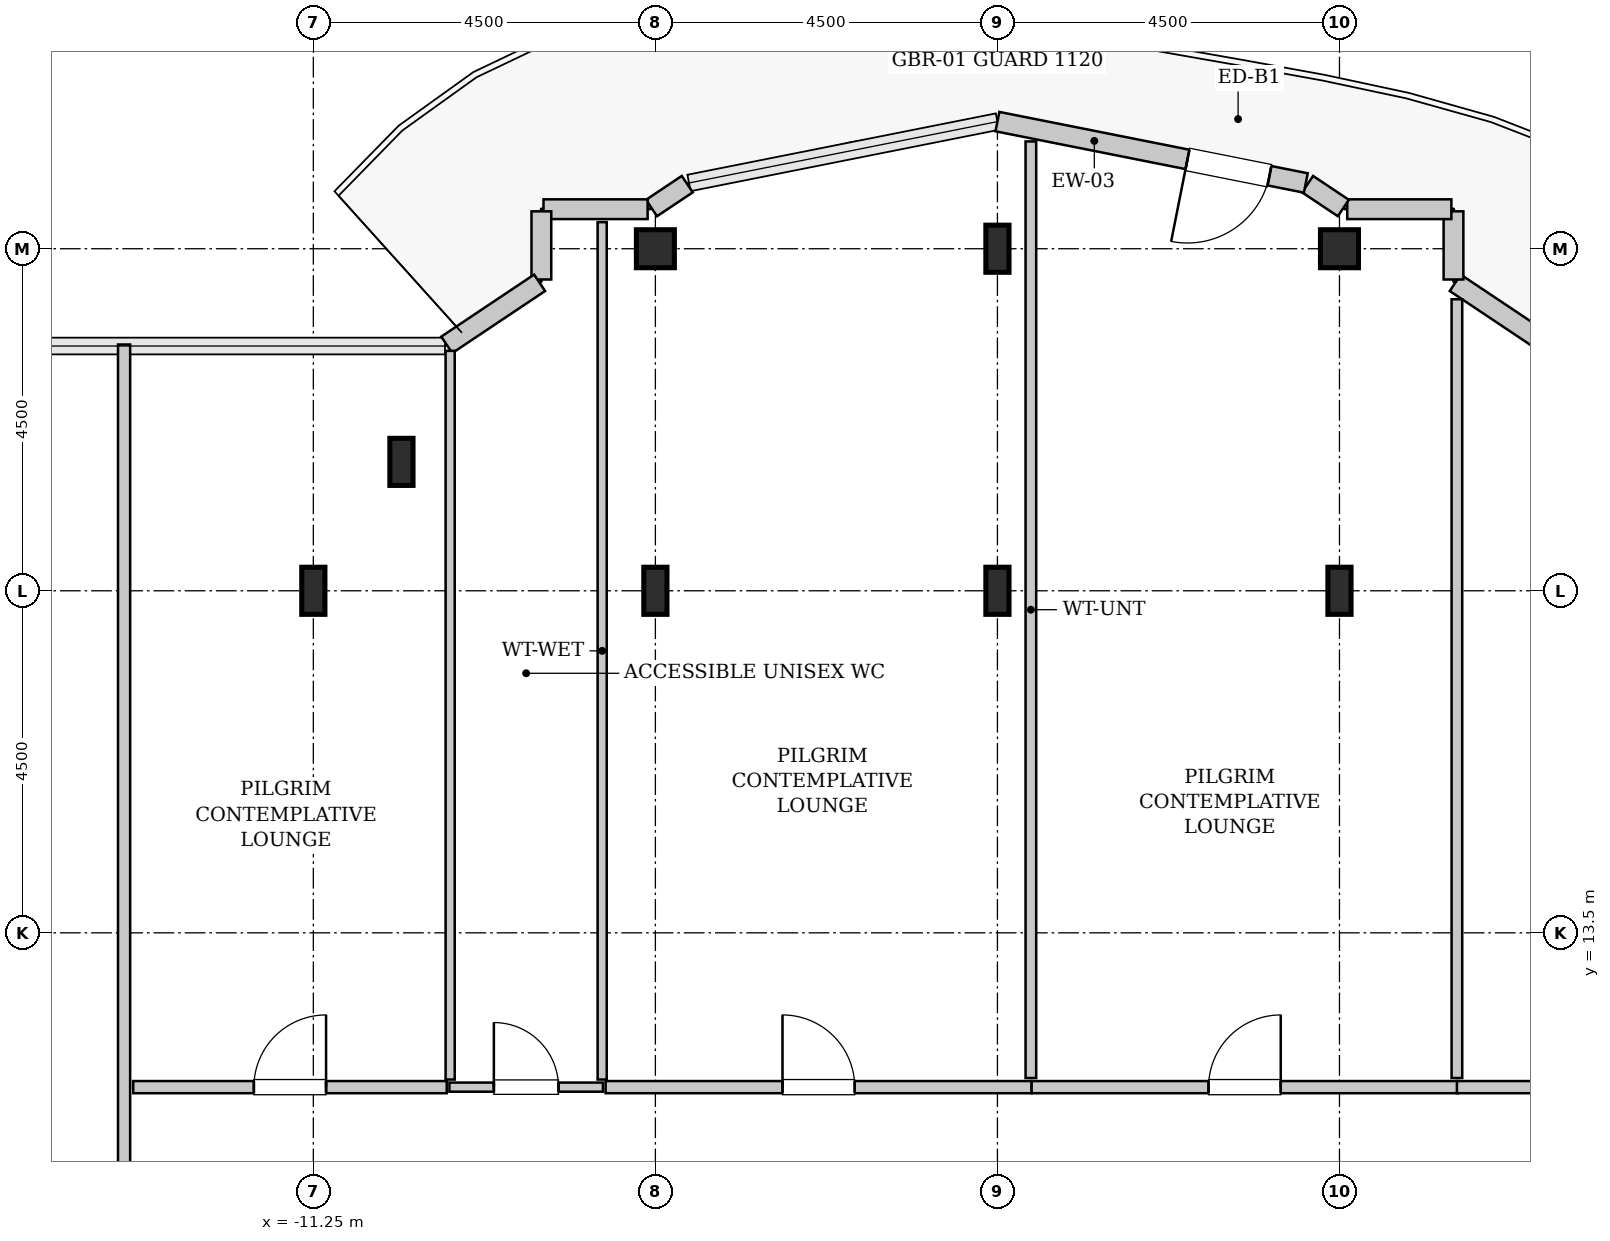
"""IFC4 building model, lengths in metres.
Left out: names, types, materials, properties, quantities, classifications, styles, units other than length and angle.
Written with IfcOpenShell. Run it as: python <this file> out.ifc"""

import sys

from ifc_helpers import new_model, si_unit, direction, frame, frame_2d, origin, origin_2d, place, context, subcontext, project, spatial, rectangle, hollow_rectangle, i_section, extrude, source, transform, mapped, element, fill, save


model = new_model("IFC4")
c1 = context("Model", 3, precision=1e-05, world=origin(), true_north=direction((0.0, 1.0)))
c2 = subcontext(c1, "Body", "Model", "MODEL_VIEW")
j1 = project(units=[si_unit("LENGTHUNIT", "METRE"), si_unit("PLANEANGLEUNIT", "RADIAN")], contexts=[c1])
p1 = place(None, origin())
s1 = spatial("IfcSite", under=j1, at=p1, CompositionType="ELEMENT")
p2 = place(p1, origin())
s2 = spatial("IfcBuilding", under=s1, at=p2, CompositionType="ELEMENT")
p3 = place(p2, frame((0.0, 0.0, 310.2)))
s3 = spatial("IfcBuildingStorey", under=s2, at=p3, CompositionType="ELEMENT", Elevation=310.2)
m1 = source(origin(), c2, "Body", "SweptSolid", [
    extrude(i_section(OverallWidth=0.305, OverallDepth=0.62, WebThickness=0.021, FlangeThickness=0.04, FilletRadius=0.027, at=origin_2d()), origin(), (0.0, 0.0, 1.0), 3.8),
])
for number, where, z_axis, x_axis in (
    (1, (-11.25, 18.0, 0.0), (0.0, 0.0, 1.0), (1.0, 0.0, 0.0)),
    (2, (-10.091, 19.696, 0.0), (0.0, 0.0, 1.0), (1.0, 0.0, 0.0)),
    (3, (-6.75, 18.0, 0.0), (0.0, 0.0, 1.0), (1.0, 0.0, 0.0)),
):
    element("IfcColumn", number, at=place(p3, frame(where, z_axis=z_axis, x_axis=x_axis)), inside=s3, PredefinedType="COLUMN", context=c2, shape_type="MappedRepresentation", body=[
        mapped(m1, transform((0.0, 0.0, 0.0), x_axis=(1.0, 0.0, 0.0), y_axis=(0.0, 1.0, 0.0), z_axis=(0.0, 0.0, 1.0), scale=1.0)),
    ])
m2 = source(origin(), c2, "Body", "SweptSolid", [
    extrude(hollow_rectangle(XDim=0.5, YDim=0.5, WallThickness=0.025, InnerFilletRadius=0.025, OuterFilletRadius=0.05, at=origin_2d()), origin(), (0.0, 0.0, 1.0), 3.8),
])
p4 = place(p3, frame((-6.75, 22.5, 0.0), z_axis=(0.0, 0.0, 1.0), x_axis=(1.0, 0.0, 0.0)))
e4 = element("IfcColumn", 4, at=p4, inside=s3, PredefinedType="COLUMN", context=c2, shape_type="MappedRepresentation", body=[
    mapped(m2, transform((0.0, 0.0, 0.0), x_axis=(1.0, 0.0, 0.0), y_axis=(0.0, 1.0, 0.0), z_axis=(0.0, 0.0, 1.0), scale=1.0)),
])
for number, where, z_axis, x_axis in (
    (5, (-2.25, 18.0, 0.0), (0.0, 0.0, 1.0), (1.0, 0.0, 0.0)),
    (6, (-2.25, 22.5, 0.0), (0.0, 0.0, 1.0), (1.0, 0.0, 0.0)),
    (7, (2.25, 18.0, 0.0), (0.0, 0.0, 1.0), (1.0, 0.0, 0.0)),
):
    element("IfcColumn", number, at=place(p3, frame(where, z_axis=z_axis, x_axis=x_axis)), inside=s3, PredefinedType="COLUMN", context=c2, shape_type="MappedRepresentation", body=[
        mapped(m1, transform((0.0, 0.0, 0.0), x_axis=(1.0, 0.0, 0.0), y_axis=(0.0, 1.0, 0.0), z_axis=(0.0, 0.0, 1.0), scale=1.0)),
    ])
p5 = place(p3, frame((2.25, 22.5, 0.0), z_axis=(0.0, 0.0, 1.0), x_axis=(1.0, 0.0, 0.0)))
e8 = element("IfcColumn", 8, at=p5, inside=s3, PredefinedType="COLUMN", context=c2, shape_type="MappedRepresentation", body=[
    mapped(m2, transform((0.0, 0.0, 0.0), x_axis=(1.0, 0.0, 0.0), y_axis=(0.0, 1.0, 0.0), z_axis=(0.0, 0.0, 1.0), scale=1.0)),
])
m3 = source(origin(), c2, "Body", "SweptSolid", [
    extrude(rectangle(XDim=1.469, YDim=0.26, at=frame_2d((0.734, 0.0))), origin(), (0.0, 0.0, 1.0), 3.55),
])
p6 = place(p3, frame((4.995, 21.236, 0.0), z_axis=(0.0, 0.0, 1.0), x_axis=(-0.831461760506, 0.555581983884, 0.0)))
e9 = element("IfcWall", 9, at=p6, inside=s3, PredefinedType="SOLIDWALL", context=c2, shape_type="MappedRepresentation", body=[
    mapped(m3, transform((0.0, 0.0, 0.0), x_axis=(1.0, 0.0, 0.0), y_axis=(0.0, 1.0, 0.0), z_axis=(0.0, 0.0, 1.0), scale=1.0)),
])
m4 = source(origin(), c2, "Body", "SweptSolid", [
    extrude(rectangle(XDim=0.897, YDim=0.26, at=frame_2d((0.448, 0.0))), origin(), (0.0, 0.0, 1.0), 3.55),
])
p7 = place(p3, frame((3.75, 22.095, 0.0), z_axis=(0.0, 0.0, 1.0), x_axis=(0.0, 1.0, 0.0)))
e10 = element("IfcWall", 10, at=p7, inside=s3, PredefinedType="SOLIDWALL", context=c2, shape_type="MappedRepresentation", body=[
    mapped(m4, transform((0.0, 0.0, 0.0), x_axis=(1.0, 0.0, 0.0), y_axis=(0.0, 1.0, 0.0), z_axis=(0.0, 0.0, 1.0), scale=1.0)),
])
m5 = source(origin(), c2, "Body", "SweptSolid", [
    extrude(rectangle(XDim=1.37, YDim=0.26, at=frame_2d((0.685, 0.0))), origin(), (0.0, 0.0, 1.0), 3.55),
])
p8 = place(p3, frame((3.722, 23.02, 0.0), z_axis=(0.0, 0.0, 1.0), x_axis=(-1.0, 0.0, 0.0)))
e11 = element("IfcWall", 11, at=p8, inside=s3, PredefinedType="SOLIDWALL", context=c2, shape_type="MappedRepresentation", body=[
    mapped(m5, transform((0.0, 0.0, 0.0), x_axis=(1.0, 0.0, 0.0), y_axis=(0.0, 1.0, 0.0), z_axis=(0.0, 0.0, 1.0), scale=1.0)),
])
m6 = source(origin(), c2, "Body", "SweptSolid", [
    extrude(rectangle(XDim=0.565, YDim=0.26, at=frame_2d((0.283, 0.0))), origin(), (0.0, 0.0, 1.0), 3.55),
])
p9 = place(p3, frame((2.301, 23.036, 0.0), z_axis=(0.0, 0.0, 1.0), x_axis=(-0.831651492666, 0.555297933317, 0.0)))
e12 = element("IfcWall", 12, at=p9, inside=s3, PredefinedType="SOLIDWALL", context=c2, shape_type="MappedRepresentation", body=[
    mapped(m6, transform((0.0, 0.0, 0.0), x_axis=(1.0, 0.0, 0.0), y_axis=(0.0, 1.0, 0.0), z_axis=(0.0, 0.0, 1.0), scale=1.0)),
])
m7 = source(origin(), c2, "Body", "SweptSolid", [
    extrude(rectangle(XDim=4.137, YDim=0.26, at=frame_2d((2.068, 0.0))), origin(), (0.0, 0.0, 1.0), 3.55),
])
p10 = place(p3, frame((1.807, 23.365, 0.0), z_axis=(0.0, 0.0, 1.0), x_axis=(-0.980782170794, 0.195105954428, 0.0)))
e13 = element("IfcWall", 13, at=p10, inside=s3, PredefinedType="SOLIDWALL", context=c2, shape_type="MappedRepresentation", body=[
    mapped(m7, transform((0.0, 0.0, 0.0), x_axis=(1.0, 0.0, 0.0), y_axis=(0.0, 1.0, 0.0), z_axis=(0.0, 0.0, 1.0), scale=1.0)),
])
p11 = place(p10, frame((0.488, 0.0, 0.0)))
e14 = element("IfcOpeningElement", 14, at=p11, cuts=e13, PredefinedType="OPENING", context=c2, shape_type="SweptSolid", body=[
    extrude(rectangle(XDim=1.1, YDim=2.2, at=frame_2d((0.55, 1.1))), frame((0.0, 0.14, 0.0), z_axis=(0.0, -1.0, 0.0), x_axis=(1.0, 0.0, 0.0)), (0.0, 0.0, 1.0), 0.28),
])
p12 = place(p3, frame((-6.331, 23.35, 0.0), z_axis=(0.0, 0.0, 1.0), x_axis=(-0.831651492666, -0.555297933317, 0.0)))
e15 = element("IfcWall", 15, at=p12, inside=s3, PredefinedType="SOLIDWALL", context=c2, shape_type="MappedRepresentation", body=[
    mapped(m6, transform((0.0, 0.0, 0.0), x_axis=(1.0, 0.0, 0.0), y_axis=(0.0, 1.0, 0.0), z_axis=(0.0, 0.0, 1.0), scale=1.0)),
])
p13 = place(p3, frame((-6.852, 23.02, 0.0), z_axis=(0.0, 0.0, 1.0), x_axis=(-1.0, 0.0, 0.0)))
e16 = element("IfcWall", 16, at=p13, inside=s3, PredefinedType="SOLIDWALL", context=c2, shape_type="MappedRepresentation", body=[
    mapped(m5, transform((0.0, 0.0, 0.0), x_axis=(1.0, 0.0, 0.0), y_axis=(0.0, 1.0, 0.0), z_axis=(0.0, 0.0, 1.0), scale=1.0)),
])
p14 = place(p3, frame((-8.25, 22.992, 0.0), z_axis=(0.0, 0.0, 1.0), x_axis=(0.0, -1.0, 0.0)))
e17 = element("IfcWall", 17, at=p14, inside=s3, PredefinedType="SOLIDWALL", context=c2, shape_type="MappedRepresentation", body=[
    mapped(m4, transform((0.0, 0.0, 0.0), x_axis=(1.0, 0.0, 0.0), y_axis=(0.0, 1.0, 0.0), z_axis=(0.0, 0.0, 1.0), scale=1.0)),
])
p15 = place(p3, frame((-8.273, 22.052, 0.0), z_axis=(0.0, 0.0, 1.0), x_axis=(-0.831461760506, -0.555581983884, 0.0)))
e18 = element("IfcWall", 18, at=p15, inside=s3, PredefinedType="SOLIDWALL", context=c2, shape_type="MappedRepresentation", body=[
    mapped(m3, transform((0.0, 0.0, 0.0), x_axis=(1.0, 0.0, 0.0), y_axis=(0.0, 1.0, 0.0), z_axis=(0.0, 0.0, 1.0), scale=1.0)),
])
m8 = source(origin(), c2, "Body", "SweptSolid", [
    extrude(rectangle(XDim=2.02, YDim=0.12, at=frame_2d((1.01, 0.0))), origin(), (0.0, 0.0, 1.0), 3.535),
])
p16 = place(p3, frame((-9.46, 11.47, 0.0), z_axis=(0.0, 0.0, 1.0), x_axis=(1.0, 0.0, 0.0)))
e19 = element("IfcWall", 19, at=p16, inside=s3, PredefinedType="PLUMBINGWALL", context=c2, shape_type="MappedRepresentation", body=[
    mapped(m8, transform((0.0, 0.0, 0.0), x_axis=(1.0, 0.0, 0.0), y_axis=(0.0, 1.0, 0.0), z_axis=(0.0, 0.0, 1.0), scale=1.0)),
])
p17 = place(p16, frame((0.585, 0.0, 0.0)))
e20 = element("IfcOpeningElement", 20, at=p17, cuts=e19, PredefinedType="OPENING", context=c2, shape_type="SweptSolid", body=[
    extrude(rectangle(XDim=0.85, YDim=2.1, at=frame_2d((0.425, 1.05))), frame((0.0, 0.07, 0.0), z_axis=(0.0, -1.0, 0.0), x_axis=(1.0, 0.0, 0.0)), (0.0, 0.0, 1.0), 0.14),
])
m9 = source(origin(), c2, "Body", "SweptSolid", [
    extrude(rectangle(XDim=11.28, YDim=0.12, at=frame_2d((5.64, 0.0))), origin(), (0.0, 0.0, 1.0), 3.535),
])
p18 = place(p3, frame((-7.45, 11.57, 0.0), z_axis=(0.0, 0.0, 1.0), x_axis=(0.0, 1.0, 0.0)))
e21 = element("IfcWall", 21, at=p18, inside=s3, PredefinedType="PLUMBINGWALL", context=c2, shape_type="MappedRepresentation", body=[
    mapped(m9, transform((0.0, 0.0, 0.0), x_axis=(1.0, 0.0, 0.0), y_axis=(0.0, 1.0, 0.0), z_axis=(0.0, 0.0, 1.0), scale=1.0)),
])
m10 = source(origin(), c2, "Body", "SweptSolid", [
    extrude(rectangle(XDim=9.587, YDim=0.12, at=frame_2d((4.793, 0.0))), origin(), (0.0, 0.0, 1.0), 3.535),
])
p19 = place(p3, frame((-9.45, 11.57, 0.0), z_axis=(0.0, 0.0, 1.0), x_axis=(0.0, 1.0, 0.0)))
e22 = element("IfcWall", 22, at=p19, inside=s3, PredefinedType="PLUMBINGWALL", context=c2, shape_type="MappedRepresentation", body=[
    mapped(m10, transform((0.0, 0.0, 0.0), x_axis=(1.0, 0.0, 0.0), y_axis=(0.0, 1.0, 0.0), z_axis=(0.0, 0.0, 1.0), scale=1.0)),
])
m11 = source(origin(), c2, "Body", "SweptSolid", [
    extrude(rectangle(XDim=13.153, YDim=0.16, at=frame_2d((6.576, 0.0))), origin(), (0.0, 0.0, 1.0), 3.535),
])
p20 = place(p3, frame((-13.74, 8.087, 0.0), z_axis=(0.0, 0.0, 1.0), x_axis=(0.0, 1.0, 0.0)))
e23 = element("IfcWall", 23, at=p20, inside=s3, PredefinedType="PARTITIONING", context=c2, shape_type="MappedRepresentation", body=[
    mapped(m11, transform((0.0, 0.0, 0.0), x_axis=(1.0, 0.0, 0.0), y_axis=(0.0, 1.0, 0.0), z_axis=(0.0, 0.0, 1.0), scale=1.0)),
])
p21 = place(p20, frame((1.236, 0.0, 0.0)))
e24 = element("IfcOpeningElement", 24, at=p21, cuts=e23, PredefinedType="OPENING", context=c2, shape_type="SweptSolid", body=[
    extrude(rectangle(XDim=0.95, YDim=2.1, at=frame_2d((0.475, 1.05))), frame((0.0, 0.09, 0.0), z_axis=(0.0, -1.0, 0.0), x_axis=(1.0, 0.0, 0.0)), (0.0, 0.0, 1.0), 0.18),
])
m12 = source(origin(), c2, "Body", "SweptSolid", [
    extrude(rectangle(XDim=4.125, YDim=0.16, at=frame_2d((2.062, 0.0))), origin(), (0.0, 0.0, 1.0), 3.535),
])
p22 = place(p3, frame((-13.62, 11.47, 0.0), z_axis=(0.0, 0.0, 1.0), x_axis=(1.0, 0.0, 0.0)))
e25 = element("IfcWall", 25, at=p22, inside=s3, PredefinedType="PARTITIONING", context=c2, shape_type="MappedRepresentation", body=[
    mapped(m12, transform((0.0, 0.0, 0.0), x_axis=(1.0, 0.0, 0.0), y_axis=(0.0, 1.0, 0.0), z_axis=(0.0, 0.0, 1.0), scale=1.0)),
])
p23 = place(p22, frame((1.587, 0.0, 0.0)))
e26 = element("IfcOpeningElement", 26, at=p23, cuts=e25, PredefinedType="OPENING", context=c2, shape_type="SweptSolid", body=[
    extrude(rectangle(XDim=0.95, YDim=2.1, at=frame_2d((0.475, 1.05))), frame((0.0, 0.09, 0.0), z_axis=(0.0, -1.0, 0.0), x_axis=(1.0, 0.0, 0.0)), (0.0, 0.0, 1.0), 0.18),
])
m13 = source(origin(), c2, "Body", "SweptSolid", [
    extrude(rectangle(XDim=5.605, YDim=0.16, at=frame_2d((2.802, 0.0))), origin(), (0.0, 0.0, 1.0), 3.535),
])
p24 = place(p3, frame((-7.405, 11.47, 0.0), z_axis=(0.0, 0.0, 1.0), x_axis=(1.0, 0.0, 0.0)))
e27 = element("IfcWall", 27, at=p24, inside=s3, PredefinedType="PARTITIONING", context=c2, shape_type="MappedRepresentation", body=[
    mapped(m13, transform((0.0, 0.0, 0.0), x_axis=(1.0, 0.0, 0.0), y_axis=(0.0, 1.0, 0.0), z_axis=(0.0, 0.0, 1.0), scale=1.0)),
])
p25 = place(p24, frame((2.327, 0.0, 0.0)))
e28 = element("IfcOpeningElement", 28, at=p25, cuts=e27, PredefinedType="OPENING", context=c2, shape_type="SweptSolid", body=[
    extrude(rectangle(XDim=0.95, YDim=2.1, at=frame_2d((0.475, 1.05))), frame((0.0, 0.09, 0.0), z_axis=(0.0, -1.0, 0.0), x_axis=(1.0, 0.0, 0.0)), (0.0, 0.0, 1.0), 0.18),
])
m14 = source(origin(), c2, "Body", "SweptSolid", [
    extrude(rectangle(XDim=12.322, YDim=0.14, at=frame_2d((6.161, 0.0))), origin(), (0.0, 0.0, 1.0), 2.975),
])
p26 = place(p3, frame((-1.81, 11.59, 0.0), z_axis=(0.0, 0.0, 1.0), x_axis=(0.0, 1.0, 0.0)))
e29 = element("IfcWall", 29, at=p26, inside=s3, PredefinedType="PARTITIONING", context=c2, shape_type="MappedRepresentation", body=[
    mapped(m14, transform((0.0, 0.0, 0.0), x_axis=(1.0, 0.0, 0.0), y_axis=(0.0, 1.0, 0.0), z_axis=(0.0, 0.0, 1.0), scale=1.0)),
])
p27 = place(p3, frame((-1.8, 11.47, 0.0), z_axis=(0.0, 0.0, 1.0), x_axis=(1.0, 0.0, 0.0)))
e30 = element("IfcWall", 30, at=p27, inside=s3, PredefinedType="PARTITIONING", context=c2, shape_type="MappedRepresentation", body=[
    mapped(m13, transform((0.0, 0.0, 0.0), x_axis=(1.0, 0.0, 0.0), y_axis=(0.0, 1.0, 0.0), z_axis=(0.0, 0.0, 1.0), scale=1.0)),
])
p28 = place(p27, frame((2.327, 0.0, 0.0)))
e31 = element("IfcOpeningElement", 31, at=p28, cuts=e30, PredefinedType="OPENING", context=c2, shape_type="SweptSolid", body=[
    extrude(rectangle(XDim=0.95, YDim=2.1, at=frame_2d((0.475, 1.05))), frame((0.0, 0.09, 0.0), z_axis=(0.0, -1.0, 0.0), x_axis=(1.0, 0.0, 0.0)), (0.0, 0.0, 1.0), 0.18),
])
m15 = source(origin(), c2, "Body", "SweptSolid", [
    extrude(rectangle(XDim=10.245, YDim=0.14, at=frame_2d((5.123, 0.0))), origin(), (0.0, 0.0, 1.0), 3.535),
])
p29 = place(p3, frame((3.795, 11.59, 0.0), z_axis=(0.0, 0.0, 1.0), x_axis=(0.0, 1.0, 0.0)))
e32 = element("IfcWall", 32, at=p29, inside=s3, PredefinedType="PARTITIONING", context=c2, shape_type="MappedRepresentation", body=[
    mapped(m15, transform((0.0, 0.0, 0.0), x_axis=(1.0, 0.0, 0.0), y_axis=(0.0, 1.0, 0.0), z_axis=(0.0, 0.0, 1.0), scale=1.0)),
])
m16 = source(origin(), c2, "Body", "SweptSolid", [
    extrude(rectangle(XDim=4.965, YDim=0.16, at=frame_2d((2.482, 0.0))), origin(), (0.0, 0.0, 1.0), 3.535),
])
p30 = place(p3, frame((3.795, 11.47, 0.0), z_axis=(0.0, 0.0, 1.0), x_axis=(1.0, 0.0, 0.0)))
e33 = element("IfcWall", 33, at=p30, inside=s3, PredefinedType="PARTITIONING", context=c2, shape_type="MappedRepresentation", body=[
    mapped(m16, transform((0.0, 0.0, 0.0), x_axis=(1.0, 0.0, 0.0), y_axis=(0.0, 1.0, 0.0), z_axis=(0.0, 0.0, 1.0), scale=1.0)),
])
p31 = place(p30, frame((2.008, 0.0, 0.0)))
e34 = element("IfcOpeningElement", 34, at=p31, cuts=e33, PredefinedType="OPENING", context=c2, shape_type="SweptSolid", body=[
    extrude(rectangle(XDim=0.95, YDim=2.1, at=frame_2d((0.475, 1.05))), frame((0.0, 0.09, 0.0), z_axis=(0.0, -1.0, 0.0), x_axis=(1.0, 0.0, 0.0)), (0.0, 0.0, 1.0), 0.18),
])
m17 = source(origin(), c2, "Body", "SweptSolid", [
    extrude(rectangle(XDim=1.1, YDim=2.2, at=frame_2d((0.55, 1.1))), frame((0.0, 0.025, 0.0), z_axis=(0.0, -1.0, 0.0), x_axis=(1.0, 0.0, 0.0)), (0.0, 0.0, 1.0), 0.05),
])
p32 = place(p11, origin())
e35 = element("IfcDoor", 35, at=p32, inside=s3, OperationType="SINGLE_SWING_RIGHT", PredefinedType="DOOR", context=c2, shape_type="MappedRepresentation", body=[
    mapped(m17, transform((0.0, 0.0, 0.0), x_axis=(1.0, 0.0, 0.0), y_axis=(0.0, 1.0, 0.0), z_axis=(0.0, 0.0, 1.0), scale=1.0)),
])
fill(e14, e35)
m18 = source(origin(), c2, "Body", "SweptSolid", [
    extrude(rectangle(XDim=0.85, YDim=2.1, at=frame_2d((0.425, 1.05))), frame((0.0, 0.025, 0.0), z_axis=(0.0, -1.0, 0.0), x_axis=(1.0, 0.0, 0.0)), (0.0, 0.0, 1.0), 0.05),
])
p33 = place(p17, origin())
e36 = element("IfcDoor", 36, at=p33, inside=s3, OperationType="SINGLE_SWING_LEFT", PredefinedType="DOOR", context=c2, shape_type="MappedRepresentation", body=[
    mapped(m18, transform((0.0, 0.0, 0.0), x_axis=(1.0, 0.0, 0.0), y_axis=(0.0, 1.0, 0.0), z_axis=(0.0, 0.0, 1.0), scale=1.0)),
])
fill(e20, e36)
m19 = source(origin(), c2, "Body", "SweptSolid", [
    extrude(rectangle(XDim=0.95, YDim=2.1, at=frame_2d((0.475, 1.05))), frame((0.0, 0.025, 0.0), z_axis=(0.0, -1.0, 0.0), x_axis=(1.0, 0.0, 0.0)), (0.0, 0.0, 1.0), 0.05),
])
p34 = place(p23, origin())
e37 = element("IfcDoor", 37, at=p34, inside=s3, OperationType="SINGLE_SWING_RIGHT", PredefinedType="DOOR", context=c2, shape_type="MappedRepresentation", body=[
    mapped(m19, transform((0.0, 0.0, 0.0), x_axis=(1.0, 0.0, 0.0), y_axis=(0.0, 1.0, 0.0), z_axis=(0.0, 0.0, 1.0), scale=1.0)),
])
fill(e26, e37)
p35 = place(p25, origin())
e38 = element("IfcDoor", 38, at=p35, inside=s3, OperationType="SINGLE_SWING_LEFT", PredefinedType="DOOR", context=c2, shape_type="MappedRepresentation", body=[
    mapped(m19, transform((0.0, 0.0, 0.0), x_axis=(1.0, 0.0, 0.0), y_axis=(0.0, 1.0, 0.0), z_axis=(0.0, 0.0, 1.0), scale=1.0)),
])
fill(e28, e38)
p36 = place(p28, origin())
e39 = element("IfcDoor", 39, at=p36, inside=s3, OperationType="SINGLE_SWING_RIGHT", PredefinedType="DOOR", context=c2, shape_type="MappedRepresentation", body=[
    mapped(m19, transform((0.0, 0.0, 0.0), x_axis=(1.0, 0.0, 0.0), y_axis=(0.0, 1.0, 0.0), z_axis=(0.0, 0.0, 1.0), scale=1.0)),
])
fill(e31, e39)
save(model, sys.argv[1])
